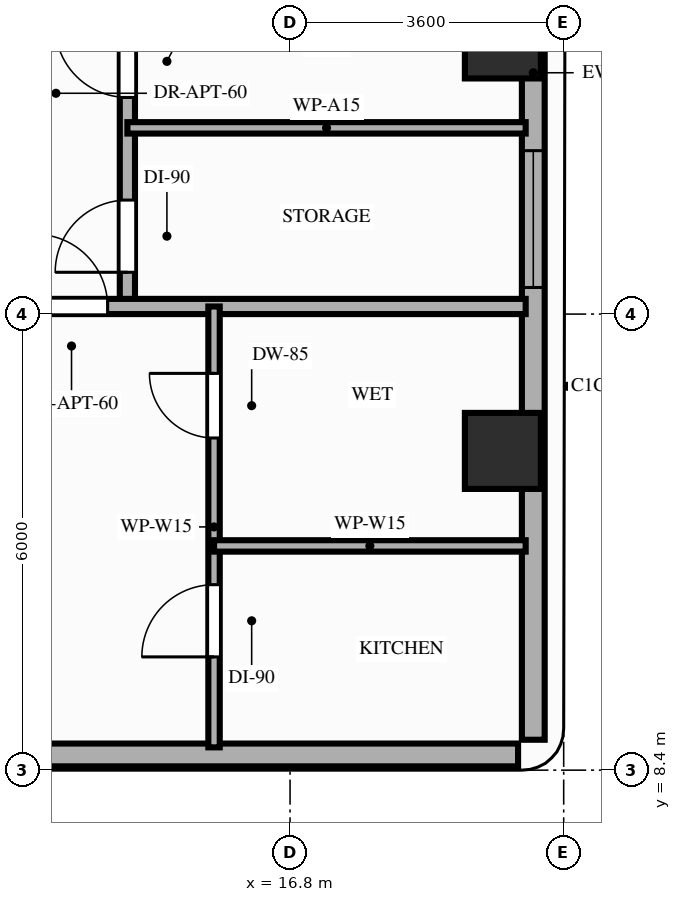
"""IFC4 building model, lengths in metres.
Left out: names, types, materials, properties, quantities, classifications, styles, units other than length and angle.
Written with IfcOpenShell. Run it as: python <this file> out.ifc"""

import sys

from ifc_helpers import new_model, si_unit, direction, frame, frame_2d, origin, origin_2d, place, context, subcontext, project, spatial, rectangle, extrude, element, fill, save


model = new_model("IFC4")
c1 = context("Model", 3, precision=1e-05, world=origin(), true_north=direction((0.0, 1.0)))
c2 = subcontext(c1, "Body", "Model", "MODEL_VIEW")
j1 = project(units=[si_unit("LENGTHUNIT", "METRE"), si_unit("PLANEANGLEUNIT", "RADIAN")], contexts=[c1])
p1 = place(None, origin())
s1 = spatial("IfcSite", under=j1, at=p1, CompositionType="ELEMENT")
p2 = place(p1, origin())
s2 = spatial("IfcBuilding", under=s1, at=p2, CompositionType="ELEMENT")
p3 = place(p2, frame((0.0, 0.0, 136.2)))
s3 = spatial("IfcBuildingStorey", under=s2, at=p3, CompositionType="ELEMENT", Elevation=136.2)
for number, where, z_axis, x_axis in (
    (1, (19.6, 12.6, 0.0), (0.0, 0.0, 1.0), (1.0, 0.0, 0.0)),
    (2, (19.6, 18.0, 0.0), (0.0, 0.0, 1.0), (1.0, 0.0, 0.0)),
):
    element("IfcColumn", number, at=place(p3, frame(where, z_axis=z_axis, x_axis=x_axis)), inside=s3, PredefinedType="COLUMN", context=c2, shape_type="SweptSolid", body=[
        extrude(rectangle(XDim=1.0, YDim=1.0, at=origin_2d()), origin(), (0.0, 0.0, 1.0), 3.2),
    ])
p4 = place(p3, frame((4.0, 8.6, 0.0), z_axis=(0.0, 0.0, 1.0), x_axis=(1.0, 0.0, 0.0)))
e3 = element("IfcWall", 3, at=p4, inside=s3, PredefinedType="STANDARD", context=c2, shape_type="SweptSolid", body=[
    extrude(rectangle(XDim=15.8, YDim=0.3, at=frame_2d((7.9, 0.0))), origin(), (0.0, 0.0, 1.0), 3.02),
])
p5 = place(p4, frame((6.9, 0.0, 0.85)))
e4 = element("IfcOpeningElement", 4, at=p5, cuts=e3, PredefinedType="OPENING", context=c2, shape_type="SweptSolid", body=[
    extrude(rectangle(XDim=1.8, YDim=1.75, at=frame_2d((0.9, 0.875))), frame((0.0, 0.16, 0.0), z_axis=(0.0, -1.0, 0.0), x_axis=(1.0, 0.0, 0.0)), (0.0, 0.0, 1.0), 0.32),
])
p6 = place(p3, frame((20.0, 8.8, 0.0), z_axis=(0.0, 0.0, 1.0), x_axis=(0.0, 1.0, 0.0)))
e5 = element("IfcWall", 5, at=p6, inside=s3, PredefinedType="STANDARD", context=c2, shape_type="SweptSolid", body=[
    extrude(rectangle(XDim=17.55, YDim=0.3, at=frame_2d((8.775, 0.0))), origin(), (0.0, 0.0, 1.0), 2.45),
])
p7 = place(p6, frame((5.95, 0.0, 0.85)))
e6 = element("IfcOpeningElement", 6, at=p7, cuts=e5, PredefinedType="OPENING", context=c2, shape_type="SweptSolid", body=[
    extrude(rectangle(XDim=1.8, YDim=1.35, at=frame_2d((0.9, 0.675))), frame((0.0, 0.16, 0.0), z_axis=(0.0, -1.0, 0.0), x_axis=(1.0, 0.0, 0.0)), (0.0, 0.0, 1.0), 0.32),
])
p8 = place(p6, frame((11.0, 0.0, 0.85)))
e7 = element("IfcOpeningElement", 7, at=p8, cuts=e5, PredefinedType="OPENING", context=c2, shape_type="SweptSolid", body=[
    extrude(rectangle(XDim=1.8, YDim=1.35, at=frame_2d((0.9, 0.675))), frame((0.0, 0.16, 0.0), z_axis=(0.0, -1.0, 0.0), x_axis=(1.0, 0.0, 0.0)), (0.0, 0.0, 1.0), 0.32),
])
p9 = place(p3, frame((14.66, 14.5, 0.0), z_axis=(0.0, 0.0, 1.0), x_axis=(0.0, 1.0, 0.0)))
e8 = element("IfcWall", 8, at=p9, inside=s3, PredefinedType="PARTITIONING", context=c2, shape_type="SweptSolid", body=[
    extrude(rectangle(XDim=13.6, YDim=0.2, at=frame_2d((6.8, 0.0))), origin(), (0.0, 0.0, 1.0), 2.45),
])
p10 = place(p9, frame((0.45, 0.0, 0.0)))
e9 = element("IfcOpeningElement", 9, at=p10, cuts=e8, PredefinedType="OPENING", context=c2, shape_type="SweptSolid", body=[
    extrude(rectangle(XDim=0.95, YDim=2.15, at=frame_2d((0.475, 1.075))), frame((0.0, 0.11, 0.0), z_axis=(0.0, -1.0, 0.0), x_axis=(1.0, 0.0, 0.0)), (0.0, 0.0, 1.0), 0.22),
])
p11 = place(p9, frame((2.75, 0.0, 0.0)))
e10 = element("IfcOpeningElement", 10, at=p11, cuts=e8, PredefinedType="OPENING", context=c2, shape_type="SweptSolid", body=[
    extrude(rectangle(XDim=0.95, YDim=2.1, at=frame_2d((0.475, 1.05))), frame((0.0, 0.11, 0.0), z_axis=(0.0, -1.0, 0.0), x_axis=(1.0, 0.0, 0.0)), (0.0, 0.0, 1.0), 0.22),
])
p12 = place(p9, frame((8.58, 0.0, 0.0)))
e11 = element("IfcOpeningElement", 11, at=p12, cuts=e8, PredefinedType="OPENING", context=c2, shape_type="SweptSolid", body=[
    extrude(rectangle(XDim=1.0, YDim=2.15, at=frame_2d((0.5, 1.075))), frame((0.0, 0.11, 0.0), z_axis=(0.0, -1.0, 0.0), x_axis=(1.0, 0.0, 0.0)), (0.0, 0.0, 1.0), 0.22),
])
p13 = place(p3, frame((3.9, 14.5, 0.0), z_axis=(0.0, 0.0, 1.0), x_axis=(1.0, 0.0, 0.0)))
e12 = element("IfcWall", 12, at=p13, inside=s3, PredefinedType="PARTITIONING", context=c2, shape_type="SweptSolid", body=[
    extrude(rectangle(XDim=16.0, YDim=0.2, at=frame_2d((8.0, 0.0))), origin(), (0.0, 0.0, 1.0), 2.45),
])
p14 = place(p13, frame((9.55, 0.0, 0.0)))
e13 = element("IfcOpeningElement", 13, at=p14, cuts=e12, PredefinedType="OPENING", context=c2, shape_type="SweptSolid", body=[
    extrude(rectangle(XDim=0.95, YDim=2.15, at=frame_2d((0.475, 1.075))), frame((0.0, 0.11, 0.0), z_axis=(0.0, -1.0, 0.0), x_axis=(1.0, 0.0, 0.0)), (0.0, 0.0, 1.0), 0.22),
])
p15 = place(p3, frame((15.8, 8.7, 0.0), z_axis=(0.0, 0.0, 1.0), x_axis=(0.0, 1.0, 0.0)))
e14 = element("IfcWall", 14, at=p15, inside=s3, PredefinedType="PARTITIONING", context=c2, shape_type="SweptSolid", body=[
    extrude(rectangle(XDim=5.8, YDim=0.15, at=frame_2d((2.9, 0.0))), origin(), (0.0, 0.0, 1.0), 2.45),
])
p16 = place(p15, frame((1.19, 0.0, 0.0)))
e15 = element("IfcOpeningElement", 15, at=p16, cuts=e14, PredefinedType="OPENING", context=c2, shape_type="SweptSolid", body=[
    extrude(rectangle(XDim=0.95, YDim=2.15, at=frame_2d((0.475, 1.075))), frame((0.0, 0.085, 0.0), z_axis=(0.0, -1.0, 0.0), x_axis=(1.0, 0.0, 0.0)), (0.0, 0.0, 1.0), 0.17),
])
p17 = place(p15, frame((4.07, 0.0, 0.0)))
e16 = element("IfcOpeningElement", 16, at=p17, cuts=e14, PredefinedType="OPENING", context=c2, shape_type="SweptSolid", body=[
    extrude(rectangle(XDim=0.85, YDim=2.1, at=frame_2d((0.425, 1.05))), frame((0.0, 0.085, 0.0), z_axis=(0.0, -1.0, 0.0), x_axis=(1.0, 0.0, 0.0)), (0.0, 0.0, 1.0), 0.17),
])
p18 = place(p3, frame((15.8, 11.35, 0.0), z_axis=(0.0, 0.0, 1.0), x_axis=(1.0, 0.0, 0.0)))
e17 = element("IfcWall", 17, at=p18, inside=s3, PredefinedType="PARTITIONING", context=c2, shape_type="SweptSolid", body=[
    extrude(rectangle(XDim=4.1, YDim=0.15, at=frame_2d((2.05, 0.0))), origin(), (0.0, 0.0, 1.0), 3.02),
])
p19 = place(p3, frame((14.66, 16.85, 0.0), z_axis=(0.0, 0.0, 1.0), x_axis=(1.0, 0.0, 0.0)))
e18 = element("IfcWall", 18, at=p19, inside=s3, PredefinedType="PARTITIONING", context=c2, shape_type="SweptSolid", body=[
    extrude(rectangle(XDim=5.24, YDim=0.15, at=frame_2d((2.62, 0.0))), origin(), (0.0, 0.0, 1.0), 2.45),
])
p20 = place(p7, origin())
e19 = element("IfcWindow", 19, at=p20, inside=s3, PartitioningType="SINGLE_PANEL", PredefinedType="WINDOW", context=c2, shape_type="SweptSolid", body=[
    extrude(rectangle(XDim=1.8, YDim=1.35, at=frame_2d((0.9, 0.675))), frame((0.0, 0.03, 0.0), z_axis=(0.0, -1.0, 0.0), x_axis=(1.0, 0.0, 0.0)), (0.0, 0.0, 1.0), 0.06),
])
fill(e6, e19)
p21 = place(p14, origin())
e20 = element("IfcDoor", 20, at=p21, inside=s3, OperationType="SINGLE_SWING_LEFT", PredefinedType="DOOR", context=c2, shape_type="SweptSolid", body=[
    extrude(rectangle(XDim=0.95, YDim=2.15, at=frame_2d((0.475, 1.075))), frame((0.0, 0.025, 0.0), z_axis=(0.0, -1.0, 0.0), x_axis=(1.0, 0.0, 0.0)), (0.0, 0.0, 1.0), 0.05),
])
fill(e13, e20)
p22 = place(p16, origin())
e21 = element("IfcDoor", 21, at=p22, inside=s3, OperationType="SINGLE_SWING_LEFT", PredefinedType="DOOR", context=c2, shape_type="SweptSolid", body=[
    extrude(rectangle(XDim=0.95, YDim=2.15, at=frame_2d((0.475, 1.075))), frame((0.0, 0.025, 0.0), z_axis=(0.0, -1.0, 0.0), x_axis=(1.0, 0.0, 0.0)), (0.0, 0.0, 1.0), 0.05),
])
fill(e15, e21)
p23 = place(p17, origin())
e22 = element("IfcDoor", 22, at=p23, inside=s3, OperationType="SINGLE_SWING_RIGHT", PredefinedType="DOOR", context=c2, shape_type="SweptSolid", body=[
    extrude(rectangle(XDim=0.85, YDim=2.1, at=frame_2d((0.425, 1.05))), frame((0.0, 0.025, 0.0), z_axis=(0.0, -1.0, 0.0), x_axis=(1.0, 0.0, 0.0)), (0.0, 0.0, 1.0), 0.05),
])
fill(e16, e22)
p24 = place(p10, origin())
e23 = element("IfcDoor", 23, at=p24, inside=s3, OperationType="SINGLE_SWING_LEFT", PredefinedType="DOOR", context=c2, shape_type="SweptSolid", body=[
    extrude(rectangle(XDim=0.95, YDim=2.15, at=frame_2d((0.475, 1.075))), frame((0.0, 0.025, 0.0), z_axis=(0.0, -1.0, 0.0), x_axis=(1.0, 0.0, 0.0)), (0.0, 0.0, 1.0), 0.05),
])
fill(e9, e23)
p25 = place(p11, origin())
e24 = element("IfcDoor", 24, at=p25, inside=s3, OperationType="SINGLE_SWING_RIGHT", PredefinedType="DOOR", context=c2, shape_type="SweptSolid", body=[
    extrude(rectangle(XDim=0.95, YDim=2.1, at=frame_2d((0.475, 1.05))), frame((0.0, 0.025, 0.0), z_axis=(0.0, -1.0, 0.0), x_axis=(1.0, 0.0, 0.0)), (0.0, 0.0, 1.0), 0.05),
])
fill(e10, e24)
save(model, sys.argv[1])
